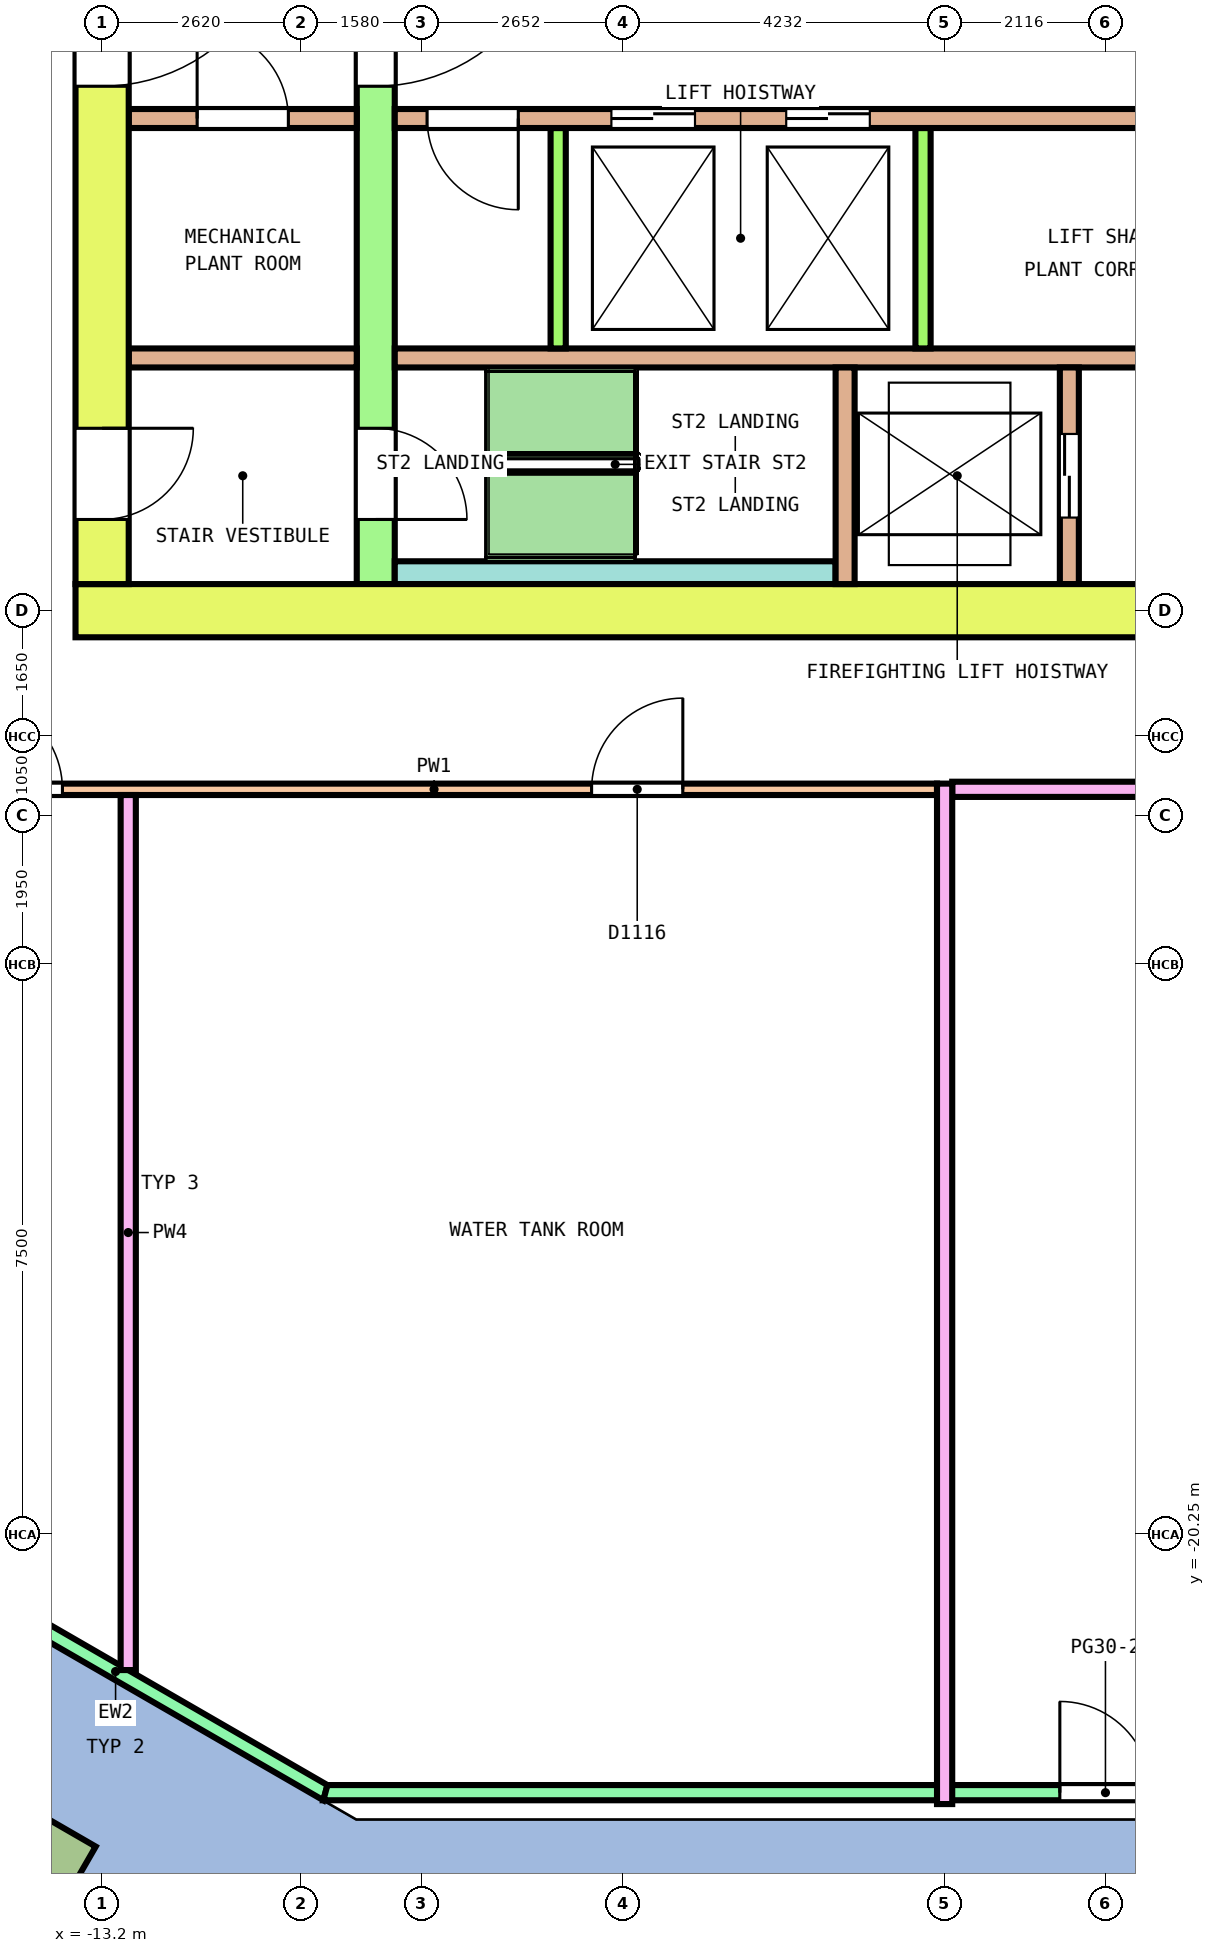
"""IFC4 building model, lengths in metres.
Left out: names, types, materials, properties, quantities, classifications, styles, units other than length and angle.
Written with IfcOpenShell. Run it as: python <this file> out.ifc"""

import sys

from ifc_helpers import new_model, si_unit, direction, frame, frame_2d, origin, origin_2d, place, context, subcontext, project, spatial, polyline, rectangle, outline, extrude, element, fill, save


model = new_model("IFC4")
c1 = context("Model", 3, precision=1e-05, world=origin(), true_north=direction((0.0, 1.0)))
c2 = subcontext(c1, "Body", "Model", "MODEL_VIEW")
j1 = project(units=[si_unit("LENGTHUNIT", "METRE"), si_unit("PLANEANGLEUNIT", "RADIAN")], contexts=[c1])
p1 = place(None, origin())
s1 = spatial("IfcSite", under=j1, at=p1, CompositionType="ELEMENT")
p2 = place(p1, origin())
s2 = spatial("IfcBuilding", under=s1, at=p2, CompositionType="ELEMENT")
p3 = place(p2, frame((0.0, 0.0, 139.6)))
s3 = spatial("IfcBuildingStorey", under=s2, at=p3, CompositionType="ELEMENT", Elevation=139.6)
p4 = place(p3, frame((-14.206, -24.606, 0.0), z_axis=(0.0, 0.0, 1.0), x_axis=(0.866025403784, -0.5, 0.0)))
e1 = element("IfcColumn", 1, at=p4, inside=s3, PredefinedType="COLUMN", context=c2, shape_type="SweptSolid", body=[
    extrude(rectangle(XDim=1.35, YDim=1.35, at=origin_2d()), origin(), (0.0, 0.0, 1.0), 5.25),
])
p5 = place(p3, frame((-15.783, -20.463, 0.0), z_axis=(0.0, 0.0, 1.0), x_axis=(0.866026138243, -0.499998727878, 0.0)))
e2 = element("IfcWall", 2, at=p5, inside=s3, PredefinedType="SOLIDWALL", context=c2, shape_type="SweptSolid", body=[
    extrude(outline(polyline([(-0.027, -0.1), (6.401, -0.1), (6.348, 0.1), (0.027, 0.1), (-0.027, -0.1)])), origin(), (0.0, 0.0, 1.0), 4.55),
])
p6 = place(p3, frame((-10.263, -23.65, 0.0), z_axis=(0.0, 0.0, 1.0), x_axis=(1.0, 0.0, 0.0)))
e3 = element("IfcWall", 3, at=p6, inside=s3, PredefinedType="SOLIDWALL", context=c2, shape_type="SweptSolid", body=[
    extrude(outline(polyline([(-0.027, -0.1), (20.552, -0.1), (20.499, 0.1), (0.027, 0.1), (-0.027, -0.1)])), origin(), (0.0, 0.0, 1.0), 4.55),
])
p7 = place(p6, frame((9.663, 0.0, 0.0)))
e4 = element("IfcOpeningElement", 4, at=p7, cuts=e3, PredefinedType="OPENING", context=c2, shape_type="SweptSolid", body=[
    extrude(rectangle(XDim=1.2, YDim=2.1, at=frame_2d((0.6, 1.05))), frame((0.0, 0.11, 0.0), z_axis=(0.0, -1.0, 0.0), x_axis=(1.0, 0.0, 0.0)), (0.0, 0.0, 1.0), 0.22),
])
p8 = place(p3, frame((-13.55, -8.1, 0.0), z_axis=(0.0, 0.0, 1.0), x_axis=(1.0, 0.0, 0.0)))
e5 = element("IfcWall", 5, at=p8, inside=s3, PredefinedType="SHEAR", context=c2, shape_type="SweptSolid", body=[
    extrude(rectangle(XDim=27.1, YDim=0.7, at=frame_2d((13.55, 0.0))), origin(), (0.0, 0.0, 1.0), 5.3),
])
p9 = place(p8, frame((15.1, 0.0, 0.0)))
e6 = element("IfcOpeningElement", 6, at=p9, cuts=e5, PredefinedType="OPENING", context=c2, shape_type="SweptSolid", body=[
    extrude(rectangle(XDim=1.2, YDim=2.1, at=frame_2d((0.6, 1.05))), frame((0.0, 0.36, 0.0), z_axis=(0.0, -1.0, 0.0), x_axis=(1.0, 0.0, 0.0)), (0.0, 0.0, 1.0), 0.72),
])
p10 = place(p3, frame((-13.2, -7.75, 0.0), z_axis=(0.0, 0.0, 1.0), x_axis=(0.0, 1.0, 0.0)))
e7 = element("IfcWall", 7, at=p10, inside=s3, PredefinedType="SHEAR", context=c2, shape_type="SweptSolid", body=[
    extrude(rectangle(XDim=15.5, YDim=0.7, at=frame_2d((7.75, 0.0))), origin(), (0.0, 0.0, 1.0), 5.3),
])
p11 = place(p10, frame((6.55, 0.0, 0.0)))
e8 = element("IfcOpeningElement", 8, at=p11, cuts=e7, PredefinedType="OPENING", context=c2, shape_type="SweptSolid", body=[
    extrude(rectangle(XDim=2.4, YDim=2.1, at=frame_2d((1.2, 1.05))), frame((0.0, 0.36, 0.0), z_axis=(0.0, -1.0, 0.0), x_axis=(1.0, 0.0, 0.0)), (0.0, 0.0, 1.0), 0.72),
])
p12 = place(p10, frame((13.45, 0.0, 0.0)))
e9 = element("IfcOpeningElement", 9, at=p12, cuts=e7, PredefinedType="OPENING", context=c2, shape_type="SweptSolid", body=[
    extrude(rectangle(XDim=1.2, YDim=2.1, at=frame_2d((0.6, 1.05))), frame((0.0, 0.36, 0.0), z_axis=(0.0, -1.0, 0.0), x_axis=(1.0, 0.0, 0.0)), (0.0, 0.0, 1.0), 0.72),
])
p13 = place(p10, frame((0.85, 0.0, 0.0)))
e10 = element("IfcOpeningElement", 10, at=p13, cuts=e7, PredefinedType="OPENING", context=c2, shape_type="SweptSolid", body=[
    extrude(rectangle(XDim=1.2, YDim=2.1, at=frame_2d((0.6, 1.05))), frame((0.0, 0.36, 0.0), z_axis=(0.0, -1.0, 0.0), x_axis=(1.0, 0.0, 0.0)), (0.0, 0.0, 1.0), 0.72),
])
p14 = place(p3, frame((-9.6, -7.75, 0.0), z_axis=(0.0, 0.0, 1.0), x_axis=(0.0, 1.0, 0.0)))
e11 = element("IfcWall", 11, at=p14, inside=s3, PredefinedType="SHEAR", context=c2, shape_type="SweptSolid", body=[
    extrude(rectangle(XDim=15.5, YDim=0.5, at=frame_2d((7.75, 0.0))), origin(), (0.0, 0.0, 1.0), 5.3),
])
p15 = place(p14, frame((6.55, 0.0, 0.0)))
e12 = element("IfcOpeningElement", 12, at=p15, cuts=e11, PredefinedType="OPENING", context=c2, shape_type="SweptSolid", body=[
    extrude(rectangle(XDim=2.4, YDim=2.1, at=frame_2d((1.2, 1.05))), frame((0.0, 0.26, 0.0), z_axis=(0.0, -1.0, 0.0), x_axis=(1.0, 0.0, 0.0)), (0.0, 0.0, 1.0), 0.52),
])
p16 = place(p14, frame((13.45, 0.0, 0.0)))
e13 = element("IfcOpeningElement", 13, at=p16, cuts=e11, PredefinedType="OPENING", context=c2, shape_type="SweptSolid", body=[
    extrude(rectangle(XDim=1.2, YDim=2.1, at=frame_2d((0.6, 1.05))), frame((0.0, 0.26, 0.0), z_axis=(0.0, -1.0, 0.0), x_axis=(1.0, 0.0, 0.0)), (0.0, 0.0, 1.0), 0.52),
])
p17 = place(p14, frame((0.85, 0.0, 0.0)))
e14 = element("IfcOpeningElement", 14, at=p17, cuts=e11, PredefinedType="OPENING", context=c2, shape_type="SweptSolid", body=[
    extrude(rectangle(XDim=1.2, YDim=2.1, at=frame_2d((0.6, 1.05))), frame((0.0, 0.26, 0.0), z_axis=(0.0, -1.0, 0.0), x_axis=(1.0, 0.0, 0.0)), (0.0, 0.0, 1.0), 0.52),
])
p18 = place(p3, frame((-12.85, -1.625, 0.0), z_axis=(0.0, 0.0, 1.0), x_axis=(1.0, 0.0, 0.0)))
e15 = element("IfcWall", 15, at=p18, inside=s3, PredefinedType="SOLIDWALL", context=c2, shape_type="SweptSolid", body=[
    extrude(rectangle(XDim=3.0, YDim=0.25, at=frame_2d((1.5, 0.0))), origin(), (0.0, 0.0, 1.0), 5.3),
])
p19 = place(p18, frame((0.9, 0.0, 0.0)))
e16 = element("IfcOpeningElement", 16, at=p19, cuts=e15, PredefinedType="OPENING", context=c2, shape_type="SweptSolid", body=[
    extrude(rectangle(XDim=1.2, YDim=2.1, at=frame_2d((0.6, 1.05))), frame((0.0, 0.135, 0.0), z_axis=(0.0, -1.0, 0.0), x_axis=(1.0, 0.0, 0.0)), (0.0, 0.0, 1.0), 0.27),
])
p20 = place(p3, frame((-9.35, -1.625, 0.0), z_axis=(0.0, 0.0, 1.0), x_axis=(1.0, 0.0, 0.0)))
e17 = element("IfcWall", 17, at=p20, inside=s3, PredefinedType="SOLIDWALL", context=c2, shape_type="SweptSolid", body=[
    extrude(rectangle(XDim=18.7, YDim=0.25, at=frame_2d((9.35, 0.0))), origin(), (0.0, 0.0, 1.0), 5.3),
])
p21 = place(p20, frame((2.85, 0.0, 0.0)))
e18 = element("IfcOpeningElement", 18, at=p21, cuts=e17, PredefinedType="OPENING", context=c2, shape_type="SweptSolid", body=[
    extrude(rectangle(XDim=1.1, YDim=2.1, at=frame_2d((0.55, 1.05))), frame((0.0, 0.135, 0.0), z_axis=(0.0, -1.0, 0.0), x_axis=(1.0, 0.0, 0.0)), (0.0, 0.0, 1.0), 0.27),
])
p22 = place(p20, frame((5.15, 0.0, 0.0)))
e19 = element("IfcOpeningElement", 19, at=p22, cuts=e17, PredefinedType="OPENING", context=c2, shape_type="SweptSolid", body=[
    extrude(rectangle(XDim=1.1, YDim=2.1, at=frame_2d((0.55, 1.05))), frame((0.0, 0.135, 0.0), z_axis=(0.0, -1.0, 0.0), x_axis=(1.0, 0.0, 0.0)), (0.0, 0.0, 1.0), 0.27),
])
p23 = place(p20, frame((14.8, 0.0, 0.0)))
e20 = element("IfcOpeningElement", 20, at=p23, cuts=e17, PredefinedType="OPENING", context=c2, shape_type="SweptSolid", body=[
    extrude(rectangle(XDim=1.1, YDim=2.1, at=frame_2d((0.55, 1.05))), frame((0.0, 0.135, 0.0), z_axis=(0.0, -1.0, 0.0), x_axis=(1.0, 0.0, 0.0)), (0.0, 0.0, 1.0), 0.27),
])
p24 = place(p20, frame((0.425, 0.0, 0.0)))
e21 = element("IfcOpeningElement", 21, at=p24, cuts=e17, PredefinedType="OPENING", context=c2, shape_type="SweptSolid", body=[
    extrude(rectangle(XDim=1.2, YDim=2.1, at=frame_2d((0.6, 1.05))), frame((0.0, 0.135, 0.0), z_axis=(0.0, -1.0, 0.0), x_axis=(1.0, 0.0, 0.0)), (0.0, 0.0, 1.0), 0.27),
])
p25 = place(p20, frame((17.075, 0.0, 0.0)))
e22 = element("IfcOpeningElement", 22, at=p25, cuts=e17, PredefinedType="OPENING", context=c2, shape_type="SweptSolid", body=[
    extrude(rectangle(XDim=1.2, YDim=2.1, at=frame_2d((0.6, 1.05))), frame((0.0, 0.135, 0.0), z_axis=(0.0, -1.0, 0.0), x_axis=(1.0, 0.0, 0.0)), (0.0, 0.0, 1.0), 0.27),
])
p26 = place(p3, frame((-12.85, -4.775, 0.0), z_axis=(0.0, 0.0, 1.0), x_axis=(1.0, 0.0, 0.0)))
e23 = element("IfcWall", 23, at=p26, inside=s3, PredefinedType="SOLIDWALL", context=c2, shape_type="SweptSolid", body=[
    extrude(rectangle(XDim=3.0, YDim=0.25, at=frame_2d((1.5, 0.0))), origin(), (0.0, 0.0, 1.0), 5.3),
])
p27 = place(p3, frame((-9.35, -4.775, 0.0), z_axis=(0.0, 0.0, 1.0), x_axis=(1.0, 0.0, 0.0)))
e24 = element("IfcWall", 24, at=p27, inside=s3, PredefinedType="SOLIDWALL", context=c2, shape_type="SweptSolid", body=[
    extrude(rectangle(XDim=18.7, YDim=0.25, at=frame_2d((9.35, 0.0))), origin(), (0.0, 0.0, 1.0), 5.3),
])
for number, where, z_axis, x_axis in (
    (25, (-7.2, -4.65, 0.0), (0.0, 0.0, 1.0), (0.0, 1.0, 0.0)),
    (26, (-2.4, -4.65, 0.0), (0.0, 0.0, 1.0), (0.0, 1.0, 0.0)),
):
    element("IfcWall", number, at=place(p3, frame(where, z_axis=z_axis, x_axis=x_axis)), inside=s3, PredefinedType="SOLIDWALL", context=c2, shape_type="SweptSolid", body=[
        extrude(rectangle(XDim=2.9, YDim=0.2, at=frame_2d((1.45, 0.0))), origin(), (0.0, 0.0, 1.0), 5.3),
    ])
p28 = place(p3, frame((-9.35, -7.6, 0.0), z_axis=(0.0, 0.0, 1.0), x_axis=(1.0, 0.0, 0.0)))
e27 = element("IfcWall", 27, at=p28, inside=s3, PredefinedType="SOLIDWALL", context=c2, shape_type="SweptSolid", body=[
    extrude(rectangle(XDim=5.8, YDim=0.3, at=frame_2d((2.9, 0.0))), origin(), (0.0, 0.0, 1.0), 5.3),
])
p29 = place(p3, frame((-3.425, -7.75, 0.0), z_axis=(0.0, 0.0, 1.0), x_axis=(0.0, 1.0, 0.0)))
e28 = element("IfcWall", 28, at=p29, inside=s3, PredefinedType="SOLIDWALL", context=c2, shape_type="SweptSolid", body=[
    extrude(rectangle(XDim=2.85, YDim=0.25, at=frame_2d((1.425, 0.0))), origin(), (0.0, 0.0, 1.0), 5.3),
])
p30 = place(p3, frame((-0.475, -7.75, 0.0), z_axis=(0.0, 0.0, 1.0), x_axis=(0.0, 1.0, 0.0)))
e29 = element("IfcWall", 29, at=p30, inside=s3, PredefinedType="SOLIDWALL", context=c2, shape_type="SweptSolid", body=[
    extrude(rectangle(XDim=2.85, YDim=0.25, at=frame_2d((1.425, 0.0))), origin(), (0.0, 0.0, 1.0), 5.3),
])
p31 = place(p30, frame((0.875, 0.0, 0.0)))
e30 = element("IfcOpeningElement", 30, at=p31, cuts=e29, PredefinedType="OPENING", context=c2, shape_type="SweptSolid", body=[
    extrude(rectangle(XDim=1.1, YDim=2.1, at=frame_2d((0.55, 1.05))), frame((0.0, 0.135, 0.0), z_axis=(0.0, -1.0, 0.0), x_axis=(1.0, 0.0, 0.0)), (0.0, 0.0, 1.0), 0.27),
])
p32 = place(p3, frame((-15.45, -10.45, 0.0), z_axis=(0.0, 0.0, 1.0), x_axis=(1.0, 0.0, 0.0)))
e31 = element("IfcWall", 31, at=p32, inside=s3, PredefinedType="PARTITIONING", context=c2, shape_type="SweptSolid", body=[
    extrude(rectangle(XDim=13.234, YDim=0.15, at=frame_2d((6.617, 0.0))), origin(), (0.0, 0.0, 1.0), 4.25),
])
p33 = place(p32, frame((0.528, 0.0, 0.0)))
e32 = element("IfcOpeningElement", 32, at=p33, cuts=e31, PredefinedType="OPENING", context=c2, shape_type="SweptSolid", body=[
    extrude(rectangle(XDim=1.2, YDim=2.1, at=frame_2d((0.6, 1.05))), frame((0.0, 0.085, 0.0), z_axis=(0.0, -1.0, 0.0), x_axis=(1.0, 0.0, 0.0)), (0.0, 0.0, 1.0), 0.17),
])
p34 = place(p32, frame((8.69, 0.0, 0.0)))
e33 = element("IfcOpeningElement", 33, at=p34, cuts=e31, PredefinedType="OPENING", context=c2, shape_type="SweptSolid", body=[
    extrude(rectangle(XDim=1.2, YDim=2.1, at=frame_2d((0.6, 1.05))), frame((0.0, 0.085, 0.0), z_axis=(0.0, -1.0, 0.0), x_axis=(1.0, 0.0, 0.0)), (0.0, 0.0, 1.0), 0.17),
])
p35 = place(p3, frame((-2.016, -10.45, 0.0), z_axis=(0.0, 0.0, 1.0), x_axis=(1.0, 0.0, 0.0)))
e34 = element("IfcWall", 34, at=p35, inside=s3, PredefinedType="PARTITIONING", context=c2, shape_type="SweptSolid", body=[
    extrude(rectangle(XDim=17.566, YDim=0.2, at=frame_2d((8.783, 0.0))), origin(), (0.0, 0.0, 1.0), 4.25),
])
p36 = place(p35, frame((6.786, 0.0, 0.0)))
e35 = element("IfcOpeningElement", 35, at=p36, cuts=e34, PredefinedType="OPENING", context=c2, shape_type="SweptSolid", body=[
    extrude(rectangle(XDim=1.2, YDim=2.1, at=frame_2d((0.6, 1.05))), frame((0.0, 0.11, 0.0), z_axis=(0.0, -1.0, 0.0), x_axis=(1.0, 0.0, 0.0)), (0.0, 0.0, 1.0), 0.22),
])
p37 = place(p35, frame((15.738, 0.0, 0.0)))
e36 = element("IfcOpeningElement", 36, at=p37, cuts=e34, PredefinedType="OPENING", context=c2, shape_type="SweptSolid", body=[
    extrude(rectangle(XDim=1.2, YDim=2.1, at=frame_2d((0.6, 1.05))), frame((0.0, 0.11, 0.0), z_axis=(0.0, -1.0, 0.0), x_axis=(1.0, 0.0, 0.0)), (0.0, 0.0, 1.0), 0.22),
])
p38 = place(p3, frame((-12.856, -22.037, 0.0), z_axis=(0.0, 0.0, 1.0), x_axis=(0.0, 1.0, 0.0)))
e37 = element("IfcWall", 37, at=p38, inside=s3, PredefinedType="PARTITIONING", context=c2, shape_type="SweptSolid", body=[
    extrude(rectangle(XDim=11.512, YDim=0.2, at=frame_2d((5.756, 0.0))), origin(), (0.0, 0.0, 1.0), 4.25),
])
p39 = place(p3, frame((-2.116, -23.8, 0.0), z_axis=(0.0, 0.0, 1.0), x_axis=(0.0, 1.0, 0.0)))
e38 = element("IfcWall", 38, at=p39, inside=s3, PredefinedType="PARTITIONING", context=c2, shape_type="SweptSolid", body=[
    extrude(rectangle(XDim=13.425, YDim=0.2, at=frame_2d((6.712, 0.0))), origin(), (0.0, 0.0, 1.0), 4.25),
])
p40 = place(p7, origin())
e39 = element("IfcDoor", 39, at=p40, inside=s3, OperationType="SINGLE_SWING_RIGHT", PredefinedType="DOOR", context=c2, shape_type="SweptSolid", body=[
    extrude(rectangle(XDim=1.2, YDim=2.1, at=frame_2d((0.6, 1.05))), frame((0.0, 0.025, 0.0), z_axis=(0.0, -1.0, 0.0), x_axis=(1.0, 0.0, 0.0)), (0.0, 0.0, 1.0), 0.05),
])
fill(e4, e39)
p41 = place(p21, origin())
e40 = element("IfcDoor", 40, at=p41, inside=s3, OperationType="DOUBLE_DOOR_SLIDING", PredefinedType="DOOR", context=c2, shape_type="SweptSolid", body=[
    extrude(rectangle(XDim=1.1, YDim=2.1, at=frame_2d((0.55, 1.05))), frame((0.0, 0.075, 0.0), z_axis=(0.0, -1.0, 0.0), x_axis=(1.0, 0.0, 0.0)), (0.0, 0.0, 1.0), 0.15),
])
fill(e18, e40)
p42 = place(p22, origin())
e41 = element("IfcDoor", 41, at=p42, inside=s3, OperationType="DOUBLE_DOOR_SLIDING", PredefinedType="DOOR", context=c2, shape_type="SweptSolid", body=[
    extrude(rectangle(XDim=1.1, YDim=2.1, at=frame_2d((0.55, 1.05))), frame((0.0, 0.075, 0.0), z_axis=(0.0, -1.0, 0.0), x_axis=(1.0, 0.0, 0.0)), (0.0, 0.0, 1.0), 0.15),
])
fill(e19, e41)
p43 = place(p31, origin())
e42 = element("IfcDoor", 42, at=p43, inside=s3, OperationType="DOUBLE_DOOR_SLIDING", PredefinedType="DOOR", context=c2, shape_type="SweptSolid", body=[
    extrude(rectangle(XDim=1.1, YDim=2.1, at=frame_2d((0.55, 1.05))), frame((0.0, 0.075, 0.0), z_axis=(0.0, -1.0, 0.0), x_axis=(1.0, 0.0, 0.0)), (0.0, 0.0, 1.0), 0.15),
])
fill(e30, e42)
p44 = place(p15, origin())
e43 = element("IfcDoor", 43, at=p44, inside=s3, OperationType="DOUBLE_DOOR_SINGLE_SWING", PredefinedType="DOOR", context=c2, shape_type="SweptSolid", body=[
    extrude(rectangle(XDim=2.4, YDim=2.1, at=frame_2d((1.2, 1.05))), frame((0.0, 0.2, 0.0), z_axis=(0.0, -1.0, 0.0), x_axis=(1.0, 0.0, 0.0)), (0.0, 0.0, 1.0), 0.4),
])
fill(e12, e43)
p45 = place(p11, origin())
e44 = element("IfcDoor", 44, at=p45, inside=s3, OperationType="DOUBLE_DOOR_SINGLE_SWING", PredefinedType="DOOR", context=c2, shape_type="SweptSolid", body=[
    extrude(rectangle(XDim=2.4, YDim=2.1, at=frame_2d((1.2, 1.05))), frame((0.0, 0.3, 0.0), z_axis=(0.0, -1.0, 0.0), x_axis=(1.0, 0.0, 0.0)), (0.0, 0.0, 1.0), 0.6),
])
fill(e8, e44)
p46 = place(p17, origin())
e45 = element("IfcDoor", 45, at=p46, inside=s3, OperationType="SINGLE_SWING_RIGHT", PredefinedType="DOOR", context=c2, shape_type="SweptSolid", body=[
    extrude(rectangle(XDim=1.2, YDim=2.1, at=frame_2d((0.6, 1.05))), frame((0.0, 0.2, 0.0), z_axis=(0.0, -1.0, 0.0), x_axis=(1.0, 0.0, 0.0)), (0.0, 0.0, 1.0), 0.4),
])
fill(e14, e45)
p47 = place(p13, origin())
e46 = element("IfcDoor", 46, at=p47, inside=s3, OperationType="SINGLE_SWING_LEFT", PredefinedType="DOOR", context=c2, shape_type="SweptSolid", body=[
    extrude(rectangle(XDim=1.2, YDim=2.1, at=frame_2d((0.6, 1.05))), frame((0.0, 0.3, 0.0), z_axis=(0.0, -1.0, 0.0), x_axis=(1.0, 0.0, 0.0)), (0.0, 0.0, 1.0), 0.6),
])
fill(e10, e46)
p48 = place(p19, origin())
e47 = element("IfcDoor", 47, at=p48, inside=s3, OperationType="SINGLE_SWING_RIGHT", PredefinedType="DOOR", context=c2, shape_type="SweptSolid", body=[
    extrude(rectangle(XDim=1.2, YDim=2.1, at=frame_2d((0.6, 1.05))), frame((0.0, 0.075, 0.0), z_axis=(0.0, -1.0, 0.0), x_axis=(1.0, 0.0, 0.0)), (0.0, 0.0, 1.0), 0.15),
])
fill(e16, e47)
p49 = place(p24, origin())
e48 = element("IfcDoor", 48, at=p49, inside=s3, OperationType="SINGLE_SWING_LEFT", PredefinedType="DOOR", context=c2, shape_type="SweptSolid", body=[
    extrude(rectangle(XDim=1.2, YDim=2.1, at=frame_2d((0.6, 1.05))), frame((0.0, 0.075, 0.0), z_axis=(0.0, -1.0, 0.0), x_axis=(1.0, 0.0, 0.0)), (0.0, 0.0, 1.0), 0.15),
])
fill(e21, e48)
p50 = place(p33, origin())
e49 = element("IfcDoor", 49, at=p50, inside=s3, OperationType="DOUBLE_DOOR_SINGLE_SWING", PredefinedType="DOOR", context=c2, shape_type="SweptSolid", body=[
    extrude(rectangle(XDim=1.2, YDim=2.1, at=frame_2d((0.6, 1.05))), frame((0.0, 0.025, 0.0), z_axis=(0.0, -1.0, 0.0), x_axis=(1.0, 0.0, 0.0)), (0.0, 0.0, 1.0), 0.05),
])
fill(e32, e49)
p51 = place(p34, origin())
e50 = element("IfcDoor", 50, at=p51, inside=s3, OperationType="DOUBLE_DOOR_SINGLE_SWING", PredefinedType="DOOR", context=c2, shape_type="SweptSolid", body=[
    extrude(rectangle(XDim=1.2, YDim=2.1, at=frame_2d((0.6, 1.05))), frame((0.0, 0.025, 0.0), z_axis=(0.0, -1.0, 0.0), x_axis=(1.0, 0.0, 0.0)), (0.0, 0.0, 1.0), 0.05),
])
fill(e33, e50)
save(model, sys.argv[1])
